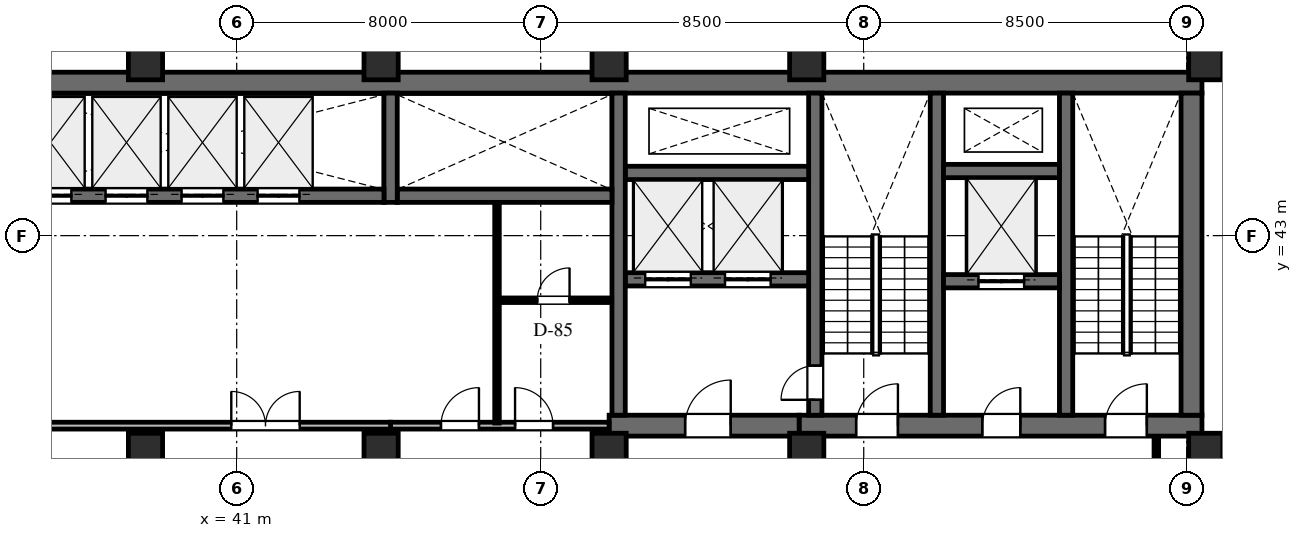
"""IFC4 building model, lengths in metres.
Left out: names, types, materials, properties, quantities, classifications, styles, units other than length and angle.
Written with IfcOpenShell. Run it as: python <this file> out.ifc"""

import sys

from ifc_helpers import new_model, si_unit, direction, frame, frame_2d, origin, origin_2d, place, context, subcontext, project, spatial, rectangle, extrude, element, fill, save


model = new_model("IFC4")
c1 = context("Model", 3, precision=1e-05, world=origin(), true_north=direction((0.0, 1.0)))
c2 = subcontext(c1, "Body", "Model", "MODEL_VIEW")
j1 = project(units=[si_unit("LENGTHUNIT", "METRE"), si_unit("PLANEANGLEUNIT", "RADIAN")], contexts=[c1])
p1 = place(None, origin())
s1 = spatial("IfcSite", under=j1, at=p1, CompositionType="ELEMENT")
p2 = place(p1, origin())
s2 = spatial("IfcBuilding", under=s1, at=p2, CompositionType="ELEMENT")
p3 = place(p2, frame((0.0, 0.0, 192.5)))
s3 = spatial("IfcBuildingStorey", under=s2, at=p3, CompositionType="ELEMENT", Elevation=192.5)
p4 = place(p3, frame((22.9, 47.025, 0.0), z_axis=(0.0, 0.0, 1.0), x_axis=(1.0, 0.0, 0.0)))
e1 = element("IfcWall", 1, at=p4, inside=s3, PredefinedType="SHEAR", context=c2, shape_type="SweptSolid", body=[
    extrude(rectangle(XDim=43.5, YDim=0.55, at=frame_2d((21.75, 0.0))), origin(), (0.0, 0.0, 1.0), 4.0),
])
p5 = place(p3, frame((55.8, 38.0, 0.0), z_axis=(0.0, 0.0, 1.0), x_axis=(1.0, 0.0, 0.0)))
e2 = element("IfcWall", 2, at=p5, inside=s3, PredefinedType="SHEAR", context=c2, shape_type="SweptSolid", body=[
    extrude(rectangle(XDim=10.6, YDim=0.55, at=frame_2d((5.3, 0.0))), origin(), (0.0, 0.0, 1.0), 4.0),
])
p6 = place(p5, frame((1.5, 0.0, 0.0)))
e3 = element("IfcOpeningElement", 3, at=p6, cuts=e2, PredefinedType="OPENING", context=c2, shape_type="SweptSolid", body=[
    extrude(rectangle(XDim=1.1, YDim=2.2, at=frame_2d((0.55, 1.1))), frame((0.0, 0.285, 0.0), z_axis=(0.0, -1.0, 0.0), x_axis=(1.0, 0.0, 0.0)), (0.0, 0.0, 1.0), 0.57),
])
p7 = place(p5, frame((4.82, 0.0, 0.0)))
e4 = element("IfcOpeningElement", 4, at=p7, cuts=e2, PredefinedType="OPENING", context=c2, shape_type="SweptSolid", body=[
    extrude(rectangle(XDim=1.0, YDim=2.15, at=frame_2d((0.5, 1.075))), frame((0.0, 0.285, 0.0), z_axis=(0.0, -1.0, 0.0), x_axis=(1.0, 0.0, 0.0)), (0.0, 0.0, 1.0), 0.57),
])
p8 = place(p5, frame((8.05, 0.0, 0.0)))
e5 = element("IfcOpeningElement", 5, at=p8, cuts=e2, PredefinedType="OPENING", context=c2, shape_type="SweptSolid", body=[
    extrude(rectangle(XDim=1.1, YDim=2.2, at=frame_2d((0.55, 1.1))), frame((0.0, 0.285, 0.0), z_axis=(0.0, -1.0, 0.0), x_axis=(1.0, 0.0, 0.0)), (0.0, 0.0, 1.0), 0.57),
])
p9 = place(p3, frame((66.125, 38.275, 0.0), z_axis=(0.0, 0.0, 1.0), x_axis=(0.0, 1.0, 0.0)))
e6 = element("IfcWall", 6, at=p9, inside=s3, PredefinedType="SHEAR", context=c2, shape_type="SweptSolid", body=[
    extrude(rectangle(XDim=8.475, YDim=0.55, at=frame_2d((4.238, 0.0))), origin(), (0.0, 0.0, 1.0), 4.0),
])
for number, where, z_axis, x_axis in (
    (7, (62.825, 38.275, 0.0), (0.0, 0.0, 1.0), (0.0, 1.0, 0.0)),
    (8, (59.425, 38.275, 0.0), (0.0, 0.0, 1.0), (0.0, 1.0, 0.0)),
):
    element("IfcWall", number, at=place(p3, frame(where, z_axis=z_axis, x_axis=x_axis)), inside=s3, PredefinedType="SHEAR", context=c2, shape_type="SweptSolid", body=[
        extrude(rectangle(XDim=8.475, YDim=0.35, at=frame_2d((4.238, 0.0))), origin(), (0.0, 0.0, 1.0), 4.0),
    ])
p10 = place(p3, frame((56.225, 38.275, 0.0), z_axis=(0.0, 0.0, 1.0), x_axis=(0.0, 1.0, 0.0)))
e9 = element("IfcWall", 9, at=p10, inside=s3, PredefinedType="SHEAR", context=c2, shape_type="SweptSolid", body=[
    extrude(rectangle(XDim=8.475, YDim=0.35, at=frame_2d((4.238, 0.0))), origin(), (0.0, 0.0, 1.0), 4.0),
])
p11 = place(p10, frame((0.405, 0.0, 0.0)))
e10 = element("IfcOpeningElement", 10, at=p11, cuts=e9, PredefinedType="OPENING", context=c2, shape_type="SweptSolid", body=[
    extrude(rectangle(XDim=0.9, YDim=2.15, at=frame_2d((0.45, 1.075))), frame((0.0, 0.185, 0.0), z_axis=(0.0, -1.0, 0.0), x_axis=(1.0, 0.0, 0.0)), (0.0, 0.0, 1.0), 0.37),
])
p12 = place(p3, frame((59.6, 41.8, 0.0), z_axis=(0.0, 0.0, 1.0), x_axis=(1.0, 0.0, 0.0)))
e11 = element("IfcWall", 11, at=p12, inside=s3, PredefinedType="SHEAR", context=c2, shape_type="SweptSolid", body=[
    extrude(rectangle(XDim=3.05, YDim=0.35, at=frame_2d((1.525, 0.0))), origin(), (0.0, 0.0, 1.0), 4.0),
])
p13 = place(p12, frame((0.92, 0.0, 0.0)))
e12 = element("IfcOpeningElement", 12, at=p13, cuts=e11, PredefinedType="OPENING", context=c2, shape_type="SweptSolid", body=[
    extrude(rectangle(XDim=1.2, YDim=2.2, at=frame_2d((0.6, 1.1))), frame((0.0, 0.185, 0.0), z_axis=(0.0, -1.0, 0.0), x_axis=(1.0, 0.0, 0.0)), (0.0, 0.0, 1.0), 0.37),
])
p14 = place(p3, frame((59.6, 44.7, 0.0), z_axis=(0.0, 0.0, 1.0), x_axis=(1.0, 0.0, 0.0)))
e13 = element("IfcWall", 13, at=p14, inside=s3, PredefinedType="SHEAR", context=c2, shape_type="SweptSolid", body=[
    extrude(rectangle(XDim=3.05, YDim=0.35, at=frame_2d((1.525, 0.0))), origin(), (0.0, 0.0, 1.0), 4.0),
])
p15 = place(p3, frame((50.8, 38.0, 0.0), z_axis=(0.0, 0.0, 1.0), x_axis=(1.0, 0.0, 0.0)))
e14 = element("IfcWall", 14, at=p15, inside=s3, PredefinedType="SHEAR", context=c2, shape_type="SweptSolid", body=[
    extrude(rectangle(XDim=5.0, YDim=0.55, at=frame_2d((2.5, 0.0))), origin(), (0.0, 0.0, 1.0), 4.0),
])
p16 = place(p15, frame((2.0, 0.0, 0.0)))
e15 = element("IfcOpeningElement", 15, at=p16, cuts=e14, PredefinedType="OPENING", context=c2, shape_type="SweptSolid", body=[
    extrude(rectangle(XDim=1.2, YDim=2.2, at=frame_2d((0.6, 1.1))), frame((0.0, 0.285, 0.0), z_axis=(0.0, -1.0, 0.0), x_axis=(1.0, 0.0, 0.0)), (0.0, 0.0, 1.0), 0.57),
])
p17 = place(p3, frame((51.225, 41.85, 0.0), z_axis=(0.0, 0.0, 1.0), x_axis=(1.0, 0.0, 0.0)))
e16 = element("IfcWall", 16, at=p17, inside=s3, PredefinedType="SHEAR", context=c2, shape_type="SweptSolid", body=[
    extrude(rectangle(XDim=4.825, YDim=0.35, at=frame_2d((2.413, 0.0))), origin(), (0.0, 0.0, 1.0), 4.0),
])
p18 = place(p17, frame((0.525, 0.0, 0.0)))
e17 = element("IfcOpeningElement", 17, at=p18, cuts=e16, PredefinedType="OPENING", context=c2, shape_type="SweptSolid", body=[
    extrude(rectangle(XDim=1.2, YDim=2.2, at=frame_2d((0.6, 1.1))), frame((0.0, 0.185, 0.0), z_axis=(0.0, -1.0, 0.0), x_axis=(1.0, 0.0, 0.0)), (0.0, 0.0, 1.0), 0.37),
])
p19 = place(p17, frame((2.625, 0.0, 0.0)))
e18 = element("IfcOpeningElement", 18, at=p19, cuts=e16, PredefinedType="OPENING", context=c2, shape_type="SweptSolid", body=[
    extrude(rectangle(XDim=1.2, YDim=2.2, at=frame_2d((0.6, 1.1))), frame((0.0, 0.185, 0.0), z_axis=(0.0, -1.0, 0.0), x_axis=(1.0, 0.0, 0.0)), (0.0, 0.0, 1.0), 0.37),
])
p20 = place(p3, frame((51.225, 44.65, 0.0), z_axis=(0.0, 0.0, 1.0), x_axis=(1.0, 0.0, 0.0)))
e19 = element("IfcWall", 19, at=p20, inside=s3, PredefinedType="SHEAR", context=c2, shape_type="SweptSolid", body=[
    extrude(rectangle(XDim=4.825, YDim=0.35, at=frame_2d((2.413, 0.0))), origin(), (0.0, 0.0, 1.0), 4.0),
])
p21 = place(p3, frame((51.05, 38.275, 0.0), z_axis=(0.0, 0.0, 1.0), x_axis=(0.0, 1.0, 0.0)))
e20 = element("IfcWall", 20, at=p21, inside=s3, PredefinedType="SHEAR", context=c2, shape_type="SweptSolid", body=[
    extrude(rectangle(XDim=8.475, YDim=0.35, at=frame_2d((4.238, 0.0))), origin(), (0.0, 0.0, 1.0), 4.0),
])
p22 = place(p3, frame((45.225, 44.05, 0.0), z_axis=(0.0, 0.0, 1.0), x_axis=(1.0, 0.0, 0.0)))
e21 = element("IfcWall", 21, at=p22, inside=s3, PredefinedType="SHEAR", context=c2, shape_type="SweptSolid", body=[
    extrude(rectangle(XDim=5.65, YDim=0.35, at=frame_2d((2.825, 0.0))), origin(), (0.0, 0.0, 1.0), 4.0),
])
p23 = place(p3, frame((45.05, 43.875, 0.0), z_axis=(0.0, 0.0, 1.0), x_axis=(0.0, 1.0, 0.0)))
e22 = element("IfcWall", 22, at=p23, inside=s3, PredefinedType="SHEAR", context=c2, shape_type="SweptSolid", body=[
    extrude(rectangle(XDim=2.875, YDim=0.35, at=frame_2d((1.438, 0.0))), origin(), (0.0, 0.0, 1.0), 4.0),
])
p24 = place(p3, frame((35.175, 44.05, 0.0), z_axis=(0.0, 0.0, 1.0), x_axis=(1.0, 0.0, 0.0)))
e23 = element("IfcWall", 23, at=p24, inside=s3, PredefinedType="SHEAR", context=c2, shape_type="SweptSolid", body=[
    extrude(rectangle(XDim=9.7, YDim=0.35, at=frame_2d((4.85, 0.0))), origin(), (0.0, 0.0, 1.0), 4.0),
])
p25 = place(p24, frame((0.375, 0.0, 0.0)))
e24 = element("IfcOpeningElement", 24, at=p25, cuts=e23, PredefinedType="OPENING", context=c2, shape_type="SweptSolid", body=[
    extrude(rectangle(XDim=1.1, YDim=2.2, at=frame_2d((0.55, 1.1))), frame((0.0, 0.185, 0.0), z_axis=(0.0, -1.0, 0.0), x_axis=(1.0, 0.0, 0.0)), (0.0, 0.0, 1.0), 0.37),
])
p26 = place(p24, frame((2.375, 0.0, 0.0)))
e25 = element("IfcOpeningElement", 25, at=p26, cuts=e23, PredefinedType="OPENING", context=c2, shape_type="SweptSolid", body=[
    extrude(rectangle(XDim=1.1, YDim=2.2, at=frame_2d((0.55, 1.1))), frame((0.0, 0.185, 0.0), z_axis=(0.0, -1.0, 0.0), x_axis=(1.0, 0.0, 0.0)), (0.0, 0.0, 1.0), 0.37),
])
p27 = place(p24, frame((4.375, 0.0, 0.0)))
e26 = element("IfcOpeningElement", 26, at=p27, cuts=e23, PredefinedType="OPENING", context=c2, shape_type="SweptSolid", body=[
    extrude(rectangle(XDim=1.1, YDim=2.2, at=frame_2d((0.55, 1.1))), frame((0.0, 0.185, 0.0), z_axis=(0.0, -1.0, 0.0), x_axis=(1.0, 0.0, 0.0)), (0.0, 0.0, 1.0), 0.37),
])
p28 = place(p24, frame((6.375, 0.0, 0.0)))
e27 = element("IfcOpeningElement", 27, at=p28, cuts=e23, PredefinedType="OPENING", context=c2, shape_type="SweptSolid", body=[
    extrude(rectangle(XDim=1.1, YDim=2.2, at=frame_2d((0.55, 1.1))), frame((0.0, 0.185, 0.0), z_axis=(0.0, -1.0, 0.0), x_axis=(1.0, 0.0, 0.0)), (0.0, 0.0, 1.0), 0.37),
])
for number, where, z_axis, x_axis in (
    (28, (66.5, 47.55, 0.0), (0.0, 0.0, 1.0), (1.0, 0.0, 0.0)),
    (29, (56.0, 47.55, 0.0), (0.0, 0.0, 1.0), (1.0, 0.0, 0.0)),
    (30, (66.5, 37.35, 0.0), (0.0, 0.0, 1.0), (1.0, 0.0, 0.0)),
    (31, (56.0, 37.35, 0.0), (0.0, 0.0, 1.0), (1.0, 0.0, 0.0)),
    (32, (50.8, 47.55, 0.0), (0.0, 0.0, 1.0), (1.0, 0.0, 0.0)),
    (33, (50.8, 37.35, 0.0), (0.0, 0.0, 1.0), (1.0, 0.0, 0.0)),
    (34, (44.8, 37.35, 0.0), (0.0, 0.0, 1.0), (1.0, 0.0, 0.0)),
    (35, (44.8, 47.55, 0.0), (0.0, 0.0, 1.0), (1.0, 0.0, 0.0)),
    (36, (38.6, 37.35, 0.0), (0.0, 0.0, 1.0), (1.0, 0.0, 0.0)),
    (37, (38.6, 47.55, 0.0), (0.0, 0.0, 1.0), (1.0, 0.0, 0.0)),
):
    element("IfcColumn", number, at=place(p3, frame(where, z_axis=z_axis, x_axis=x_axis)), inside=s3, PredefinedType="COLUMN", context=c2, shape_type="SweptSolid", body=[
        extrude(rectangle(XDim=0.9, YDim=0.9, at=origin_2d()), origin(), (0.0, 0.0, 1.0), 4.0),
    ])
p29 = place(p3, frame((68.375, 37.8, 0.0), z_axis=(0.0, 0.0, 1.0), x_axis=(-0.139173290738, -0.99026804207, 0.0)))
e38 = element("IfcWall", 38, at=p29, inside=s3, PredefinedType="STANDARD", context=c2, shape_type="SweptSolid", body=[
    extrude(rectangle(XDim=24.498, YDim=0.28, at=frame_2d((12.249, 0.0))), origin(), (0.0, 0.0, 1.0), 3.755),
])
p30 = place(p29, frame((8.198, 0.0, 0.0)))
e39 = element("IfcOpeningElement", 39, at=p30, cuts=e38, PredefinedType="OPENING", context=c2, shape_type="SweptSolid", body=[
    extrude(rectangle(XDim=1.0, YDim=2.15, at=frame_2d((0.5, 1.075))), frame((0.0, 0.15, 0.0), z_axis=(0.0, -1.0, 0.0), x_axis=(1.0, 0.0, 0.0)), (0.0, 0.0, 1.0), 0.3),
])
p31 = place(p29, frame((3.869, 0.0, 0.65)))
e40 = element("IfcOpeningElement", 40, at=p31, cuts=e38, PredefinedType="OPENING", context=c2, shape_type="SweptSolid", body=[
    extrude(rectangle(XDim=1.8, YDim=2.1, at=frame_2d((0.9, 1.05))), frame((0.0, 0.15, 0.0), z_axis=(0.0, -1.0, 0.0), x_axis=(1.0, 0.0, 0.0)), (0.0, 0.0, 1.0), 0.3),
])
p32 = place(p29, frame((15.571, 0.0, 0.65)))
e41 = element("IfcOpeningElement", 41, at=p32, cuts=e38, PredefinedType="OPENING", context=c2, shape_type="SweptSolid", body=[
    extrude(rectangle(XDim=1.8, YDim=2.1, at=frame_2d((0.9, 1.05))), frame((0.0, 0.15, 0.0), z_axis=(0.0, -1.0, 0.0), x_axis=(1.0, 0.0, 0.0)), (0.0, 0.0, 1.0), 0.3),
])
p33 = place(p3, frame((45.05, 38.0, 0.0), z_axis=(0.0, 0.0, 1.0), x_axis=(1.0, 0.0, 0.0)))
e42 = element("IfcWall", 42, at=p33, inside=s3, PredefinedType="STANDARD", context=c2, shape_type="SweptSolid", body=[
    extrude(rectangle(XDim=5.75, YDim=0.18, at=frame_2d((2.875, 0.0))), origin(), (0.0, 0.0, 1.0), 2.982),
])
p34 = place(p33, frame((1.325, 0.0, 0.0)))
e43 = element("IfcOpeningElement", 43, at=p34, cuts=e42, PredefinedType="OPENING", context=c2, shape_type="SweptSolid", body=[
    extrude(rectangle(XDim=1.0, YDim=2.15, at=frame_2d((0.5, 1.075))), frame((0.0, 0.1, 0.0), z_axis=(0.0, -1.0, 0.0), x_axis=(1.0, 0.0, 0.0)), (0.0, 0.0, 1.0), 0.2),
])
p35 = place(p33, frame((3.275, 0.0, 0.0)))
e44 = element("IfcOpeningElement", 44, at=p35, cuts=e42, PredefinedType="OPENING", context=c2, shape_type="SweptSolid", body=[
    extrude(rectangle(XDim=1.0, YDim=2.15, at=frame_2d((0.5, 1.075))), frame((0.0, 0.1, 0.0), z_axis=(0.0, -1.0, 0.0), x_axis=(1.0, 0.0, 0.0)), (0.0, 0.0, 1.0), 0.2),
])
p36 = place(p3, frame((47.85, 38.068, 0.0), z_axis=(0.0, 0.0, 1.0), x_axis=(0.0, 1.0, 0.0)))
e45 = element("IfcWall", 45, at=p36, inside=s3, PredefinedType="PARTITIONING", context=c2, shape_type="SweptSolid", body=[
    extrude(rectangle(XDim=5.799, YDim=0.12, at=frame_2d((2.899, 0.0))), origin(), (0.0, 0.0, 1.0), 3.755),
])
p37 = place(p3, frame((47.918, 41.3, 0.0), z_axis=(0.0, 0.0, 1.0), x_axis=(1.0, 0.0, 0.0)))
e46 = element("IfcWall", 46, at=p37, inside=s3, PredefinedType="PARTITIONING", context=c2, shape_type="SweptSolid", body=[
    extrude(rectangle(XDim=2.949, YDim=0.12, at=frame_2d((1.475, 0.0))), origin(), (0.0, 0.0, 1.0), 2.982),
])
p38 = place(p37, frame((0.991, 0.0, 0.0)))
e47 = element("IfcOpeningElement", 47, at=p38, cuts=e46, PredefinedType="OPENING", context=c2, shape_type="SweptSolid", body=[
    extrude(rectangle(XDim=0.85, YDim=2.1, at=frame_2d((0.425, 1.05))), frame((0.0, 0.07, 0.0), z_axis=(0.0, -1.0, 0.0), x_axis=(1.0, 0.0, 0.0)), (0.0, 0.0, 1.0), 0.14),
])
p39 = place(p3, frame((35.0, 38.0, 0.0), z_axis=(0.0, 0.0, 1.0), x_axis=(1.0, 0.0, 0.0)))
e48 = element("IfcWall", 48, at=p39, inside=s3, PredefinedType="STANDARD", context=c2, shape_type="SweptSolid", body=[
    extrude(rectangle(XDim=10.05, YDim=0.18, at=frame_2d((5.025, 0.0))), origin(), (0.0, 0.0, 1.0), 2.982),
])
p40 = place(p39, frame((5.858, 0.0, 0.0)))
e49 = element("IfcOpeningElement", 49, at=p40, cuts=e48, PredefinedType="OPENING", context=c2, shape_type="SweptSolid", body=[
    extrude(rectangle(XDim=1.8, YDim=2.2, at=frame_2d((0.9, 1.1))), frame((0.0, 0.1, 0.0), z_axis=(0.0, -1.0, 0.0), x_axis=(1.0, 0.0, 0.0)), (0.0, 0.0, 1.0), 0.2),
])
p41 = place(p3, frame((65.2, 34.4, 0.0), z_axis=(0.0, 0.0, 1.0), x_axis=(0.0, 1.0, 0.0)))
e50 = element("IfcWall", 50, at=p41, inside=s3, PredefinedType="PARTITIONING", context=c2, shape_type="SweptSolid", body=[
    extrude(rectangle(XDim=3.317, YDim=0.12, at=frame_2d((1.659, 0.0))), origin(), (0.0, 0.0, 1.0), 2.982),
])
p42 = place(p6, origin())
e51 = element("IfcDoor", 51, at=p42, inside=s3, OperationType="SINGLE_SWING_RIGHT", PredefinedType="DOOR", context=c2, shape_type="SweptSolid", body=[
    extrude(rectangle(XDim=1.1, YDim=2.2, at=frame_2d((0.55, 1.1))), frame((0.0, 0.025, 0.0), z_axis=(0.0, -1.0, 0.0), x_axis=(1.0, 0.0, 0.0)), (0.0, 0.0, 1.0), 0.05),
])
fill(e3, e51)
p43 = place(p7, origin())
e52 = element("IfcDoor", 52, at=p43, inside=s3, OperationType="SINGLE_SWING_RIGHT", PredefinedType="DOOR", context=c2, shape_type="SweptSolid", body=[
    extrude(rectangle(XDim=1.0, YDim=2.15, at=frame_2d((0.5, 1.075))), frame((0.0, 0.025, 0.0), z_axis=(0.0, -1.0, 0.0), x_axis=(1.0, 0.0, 0.0)), (0.0, 0.0, 1.0), 0.05),
])
fill(e4, e52)
p44 = place(p8, origin())
e53 = element("IfcDoor", 53, at=p44, inside=s3, OperationType="SINGLE_SWING_RIGHT", PredefinedType="DOOR", context=c2, shape_type="SweptSolid", body=[
    extrude(rectangle(XDim=1.1, YDim=2.2, at=frame_2d((0.55, 1.1))), frame((0.0, 0.025, 0.0), z_axis=(0.0, -1.0, 0.0), x_axis=(1.0, 0.0, 0.0)), (0.0, 0.0, 1.0), 0.05),
])
fill(e5, e53)
p45 = place(p16, origin())
e54 = element("IfcDoor", 54, at=p45, inside=s3, OperationType="SINGLE_SWING_RIGHT", PredefinedType="DOOR", context=c2, shape_type="SweptSolid", body=[
    extrude(rectangle(XDim=1.2, YDim=2.2, at=frame_2d((0.6, 1.1))), frame((0.0, 0.025, 0.0), z_axis=(0.0, -1.0, 0.0), x_axis=(1.0, 0.0, 0.0)), (0.0, 0.0, 1.0), 0.05),
])
fill(e15, e54)
p46 = place(p11, origin())
e55 = element("IfcDoor", 55, at=p46, inside=s3, OperationType="SINGLE_SWING_LEFT", PredefinedType="DOOR", context=c2, shape_type="SweptSolid", body=[
    extrude(rectangle(XDim=0.9, YDim=2.15, at=frame_2d((0.45, 1.075))), frame((0.0, 0.025, 0.0), z_axis=(0.0, -1.0, 0.0), x_axis=(1.0, 0.0, 0.0)), (0.0, 0.0, 1.0), 0.05),
])
fill(e10, e55)
p47 = place(p25, origin())
e56 = element("IfcDoor", 56, at=p47, inside=s3, OperationType="DOUBLE_DOOR_SLIDING", PredefinedType="DOOR", context=c2, shape_type="SweptSolid", body=[
    extrude(rectangle(XDim=1.1, YDim=2.2, at=frame_2d((0.55, 1.1))), frame((0.0, 0.025, 0.0), z_axis=(0.0, -1.0, 0.0), x_axis=(1.0, 0.0, 0.0)), (0.0, 0.0, 1.0), 0.05),
])
fill(e24, e56)
p48 = place(p26, origin())
e57 = element("IfcDoor", 57, at=p48, inside=s3, OperationType="DOUBLE_DOOR_SLIDING", PredefinedType="DOOR", context=c2, shape_type="SweptSolid", body=[
    extrude(rectangle(XDim=1.1, YDim=2.2, at=frame_2d((0.55, 1.1))), frame((0.0, 0.025, 0.0), z_axis=(0.0, -1.0, 0.0), x_axis=(1.0, 0.0, 0.0)), (0.0, 0.0, 1.0), 0.05),
])
fill(e25, e57)
p49 = place(p27, origin())
e58 = element("IfcDoor", 58, at=p49, inside=s3, OperationType="DOUBLE_DOOR_SLIDING", PredefinedType="DOOR", context=c2, shape_type="SweptSolid", body=[
    extrude(rectangle(XDim=1.1, YDim=2.2, at=frame_2d((0.55, 1.1))), frame((0.0, 0.025, 0.0), z_axis=(0.0, -1.0, 0.0), x_axis=(1.0, 0.0, 0.0)), (0.0, 0.0, 1.0), 0.05),
])
fill(e26, e58)
p50 = place(p28, origin())
e59 = element("IfcDoor", 59, at=p50, inside=s3, OperationType="DOUBLE_DOOR_SLIDING", PredefinedType="DOOR", context=c2, shape_type="SweptSolid", body=[
    extrude(rectangle(XDim=1.1, YDim=2.2, at=frame_2d((0.55, 1.1))), frame((0.0, 0.025, 0.0), z_axis=(0.0, -1.0, 0.0), x_axis=(1.0, 0.0, 0.0)), (0.0, 0.0, 1.0), 0.05),
])
fill(e27, e59)
p51 = place(p18, origin())
e60 = element("IfcDoor", 60, at=p51, inside=s3, OperationType="DOUBLE_DOOR_SLIDING", PredefinedType="DOOR", context=c2, shape_type="SweptSolid", body=[
    extrude(rectangle(XDim=1.2, YDim=2.2, at=frame_2d((0.6, 1.1))), frame((0.0, 0.025, 0.0), z_axis=(0.0, -1.0, 0.0), x_axis=(1.0, 0.0, 0.0)), (0.0, 0.0, 1.0), 0.05),
])
fill(e17, e60)
p52 = place(p19, origin())
e61 = element("IfcDoor", 61, at=p52, inside=s3, OperationType="DOUBLE_DOOR_SLIDING", PredefinedType="DOOR", context=c2, shape_type="SweptSolid", body=[
    extrude(rectangle(XDim=1.2, YDim=2.2, at=frame_2d((0.6, 1.1))), frame((0.0, 0.025, 0.0), z_axis=(0.0, -1.0, 0.0), x_axis=(1.0, 0.0, 0.0)), (0.0, 0.0, 1.0), 0.05),
])
fill(e18, e61)
p53 = place(p13, origin())
e62 = element("IfcDoor", 62, at=p53, inside=s3, OperationType="DOUBLE_DOOR_SLIDING", PredefinedType="DOOR", context=c2, shape_type="SweptSolid", body=[
    extrude(rectangle(XDim=1.2, YDim=2.2, at=frame_2d((0.6, 1.1))), frame((0.0, 0.025, 0.0), z_axis=(0.0, -1.0, 0.0), x_axis=(1.0, 0.0, 0.0)), (0.0, 0.0, 1.0), 0.05),
])
fill(e12, e62)
p54 = place(p34, origin())
e63 = element("IfcDoor", 63, at=p54, inside=s3, OperationType="SINGLE_SWING_RIGHT", PredefinedType="DOOR", context=c2, shape_type="SweptSolid", body=[
    extrude(rectangle(XDim=1.0, YDim=2.15, at=frame_2d((0.5, 1.075))), frame((0.0, 0.025, 0.0), z_axis=(0.0, -1.0, 0.0), x_axis=(1.0, 0.0, 0.0)), (0.0, 0.0, 1.0), 0.05),
])
fill(e43, e63)
p55 = place(p35, origin())
e64 = element("IfcDoor", 64, at=p55, inside=s3, OperationType="SINGLE_SWING_LEFT", PredefinedType="DOOR", context=c2, shape_type="SweptSolid", body=[
    extrude(rectangle(XDim=1.0, YDim=2.15, at=frame_2d((0.5, 1.075))), frame((0.0, 0.025, 0.0), z_axis=(0.0, -1.0, 0.0), x_axis=(1.0, 0.0, 0.0)), (0.0, 0.0, 1.0), 0.05),
])
fill(e44, e64)
p56 = place(p38, origin())
e65 = element("IfcDoor", 65, at=p56, inside=s3, OperationType="SINGLE_SWING_RIGHT", PredefinedType="DOOR", context=c2, shape_type="SweptSolid", body=[
    extrude(rectangle(XDim=0.85, YDim=2.1, at=frame_2d((0.425, 1.05))), frame((0.0, 0.025, 0.0), z_axis=(0.0, -1.0, 0.0), x_axis=(1.0, 0.0, 0.0)), (0.0, 0.0, 1.0), 0.05),
])
fill(e47, e65)
p57 = place(p40, origin())
e66 = element("IfcDoor", 66, at=p57, inside=s3, OperationType="DOUBLE_DOOR_SINGLE_SWING", PredefinedType="DOOR", context=c2, shape_type="SweptSolid", body=[
    extrude(rectangle(XDim=1.8, YDim=2.2, at=frame_2d((0.9, 1.1))), frame((0.0, 0.025, 0.0), z_axis=(0.0, -1.0, 0.0), x_axis=(1.0, 0.0, 0.0)), (0.0, 0.0, 1.0), 0.05),
])
fill(e49, e66)
save(model, sys.argv[1])
